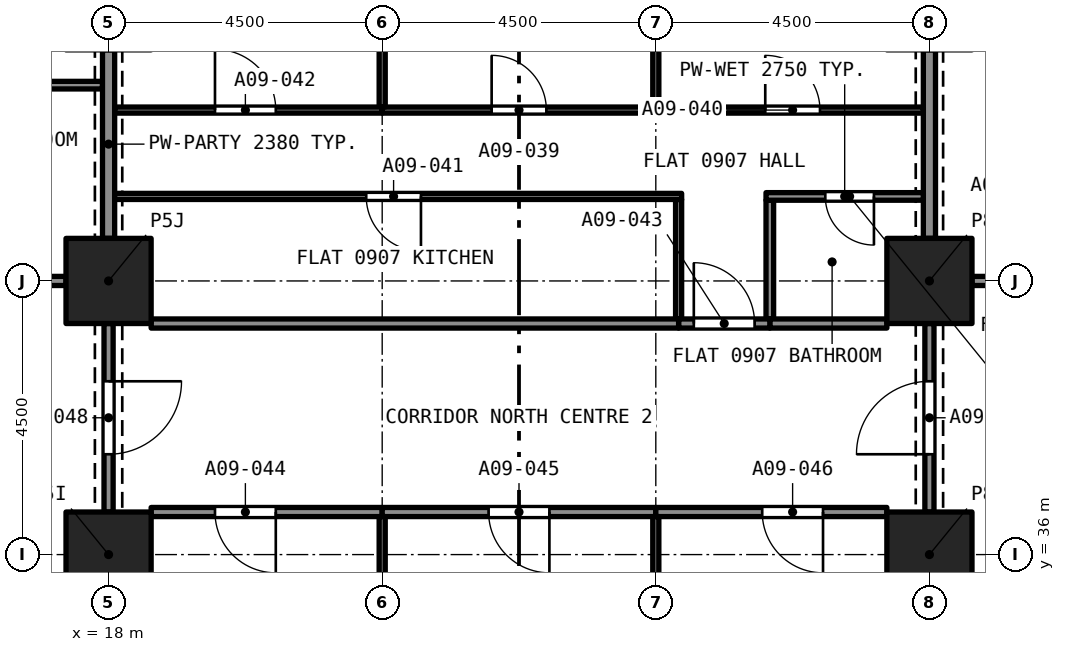
"""IFC4 building model, lengths in metres.
Left out: names, types, materials, properties, quantities, classifications, styles, units other than length and angle.
Written with IfcOpenShell. Run it as: python <this file> out.ifc"""

import sys

from ifc_helpers import new_model, si_unit, direction, frame, frame_2d, origin, origin_2d, place, context, subcontext, project, spatial, rectangle, extrude, element, fill, save


model = new_model("IFC4")
c1 = context("Model", 3, precision=1e-05, world=origin(), true_north=direction((0.0, 1.0)))
c2 = subcontext(c1, "Body", "Model", "MODEL_VIEW")
j1 = project(units=[si_unit("LENGTHUNIT", "METRE"), si_unit("PLANEANGLEUNIT", "RADIAN")], contexts=[c1])
p1 = place(None, origin())
s1 = spatial("IfcSite", under=j1, at=p1, CompositionType="ELEMENT")
p2 = place(p1, origin())
s2 = spatial("IfcBuilding", under=s1, at=p2, CompositionType="ELEMENT")
p3 = place(p2, frame((0.0, 0.0, 40.0)))
s3 = spatial("IfcBuildingStorey", under=s2, at=p3, CompositionType="ELEMENT", Elevation=40.0)
for number, where, z_axis, x_axis in (
    (1, (18.0, 36.0, 0.0), (0.0, 0.0, 1.0), (1.0, 0.0, 0.0)),
    (2, (31.5, 36.0, 0.0), (0.0, 0.0, 1.0), (1.0, 0.0, 0.0)),
    (3, (18.0, 40.5, 0.0), (0.0, 0.0, 1.0), (1.0, 0.0, 0.0)),
    (4, (31.5, 40.5, 0.0), (0.0, 0.0, 1.0), (1.0, 0.0, 0.0)),
):
    element("IfcColumn", number, at=place(p3, frame(where, z_axis=z_axis, x_axis=x_axis)), inside=s3, PredefinedType="COLUMN", context=c2, shape_type="SweptSolid", body=[
        extrude(rectangle(XDim=1.4, YDim=1.4, at=origin_2d()), origin(), (0.0, 0.0, 1.0), 3.2),
    ])
p4 = place(p3, frame((17.9, 43.72, 0.0), z_axis=(0.0, 0.0, 1.0), x_axis=(-1.0, 0.0, 0.0)))
e5 = element("IfcWall", 5, at=p4, inside=s3, PredefinedType="PARTITIONING", context=c2, shape_type="SweptSolid", body=[
    extrude(rectangle(XDim=4.327, YDim=0.125, at=frame_2d((2.163, 0.0))), origin(), (0.0, 0.0, 1.0), 2.9),
])
p5 = place(p4, frame((1.713, 0.0, 0.0)))
e6 = element("IfcOpeningElement", 6, at=p5, cuts=e5, PredefinedType="OPENING", context=c2, shape_type="SweptSolid", body=[
    extrude(rectangle(XDim=0.8, YDim=2.1, at=frame_2d((0.4, 1.05))), frame((0.0, 0.073, 0.0), z_axis=(0.0, -1.0, 0.0), x_axis=(1.0, 0.0, 0.0)), (0.0, 0.0, 1.0), 0.145),
])
p6 = place(p3, frame((18.0, 41.2, 0.0), z_axis=(0.0, 0.0, 1.0), x_axis=(0.0, 1.0, 0.0)))
e7 = element("IfcWall", 7, at=p6, inside=s3, PredefinedType="PARTITIONING", context=c2, shape_type="SweptSolid", body=[
    extrude(rectangle(XDim=3.1, YDim=0.2, at=frame_2d((1.55, 0.0))), origin(), (0.0, 0.0, 1.0), 2.38),
])
p7 = place(p3, frame((13.511, 40.5, 0.0), z_axis=(0.0, 0.0, 1.0), x_axis=(1.0, 0.0, 0.0)))
e8 = element("IfcWall", 8, at=p7, inside=s3, PredefinedType="PARTITIONING", context=c2, shape_type="SweptSolid", body=[
    extrude(rectangle(XDim=3.789, YDim=0.15, at=frame_2d((1.895, 0.0))), origin(), (0.0, 0.0, 1.0), 2.9),
])
p8 = place(p3, frame((31.5, 41.2, 0.0), z_axis=(0.0, 0.0, 1.0), x_axis=(0.0, 1.0, 0.0)))
e9 = element("IfcWall", 9, at=p8, inside=s3, PredefinedType="PARTITIONING", context=c2, shape_type="SweptSolid", body=[
    extrude(rectangle(XDim=3.1, YDim=0.2, at=frame_2d((1.55, 0.0))), origin(), (0.0, 0.0, 1.0), 2.38),
])
p9 = place(p3, frame((32.2, 40.5, 0.0), z_axis=(0.0, 0.0, 1.0), x_axis=(1.0, 0.0, 0.0)))
e10 = element("IfcWall", 10, at=p9, inside=s3, PredefinedType="PARTITIONING", context=c2, shape_type="SweptSolid", body=[
    extrude(rectangle(XDim=2.3, YDim=0.15, at=frame_2d((1.15, 0.0))), origin(), (0.0, 0.0, 1.0), 2.9),
])
p10 = place(p9, frame((1.05, 0.0, 0.0)))
e11 = element("IfcOpeningElement", 11, at=p10, cuts=e10, PredefinedType="OPENING", context=c2, shape_type="SweptSolid", body=[
    extrude(rectangle(XDim=1.0, YDim=2.1, at=frame_2d((0.5, 1.05))), frame((0.0, 0.085, 0.0), z_axis=(0.0, -1.0, 0.0), x_axis=(1.0, 0.0, 0.0)), (0.0, 0.0, 1.0), 0.17),
])
p11 = place(p3, frame((28.875, 39.875, 0.0), z_axis=(0.0, 0.0, 1.0), x_axis=(0.0, 1.0, 0.0)))
e12 = element("IfcWall", 12, at=p11, inside=s3, PredefinedType="PARTITIONING", context=c2, shape_type="SweptSolid", body=[
    extrude(rectangle(XDim=1.952, YDim=0.125, at=frame_2d((0.976, 0.0))), origin(), (0.0, 0.0, 1.0), 2.75),
])
p12 = place(p3, frame((31.4, 41.89, 0.0), z_axis=(0.0, 0.0, 1.0), x_axis=(-1.0, 0.0, 0.0)))
e13 = element("IfcWall", 13, at=p12, inside=s3, PredefinedType="PARTITIONING", context=c2, shape_type="SweptSolid", body=[
    extrude(rectangle(XDim=2.587, YDim=0.125, at=frame_2d((1.294, 0.0))), origin(), (0.0, 0.0, 1.0), 2.75),
])
p13 = place(p12, frame((0.812, 0.0, 0.0)))
e14 = element("IfcOpeningElement", 14, at=p13, cuts=e13, PredefinedType="OPENING", context=c2, shape_type="SweptSolid", body=[
    extrude(rectangle(XDim=0.8, YDim=2.1, at=frame_2d((0.4, 1.05))), frame((0.0, 0.073, 0.0), z_axis=(0.0, -1.0, 0.0), x_axis=(1.0, 0.0, 0.0)), (0.0, 0.0, 1.0), 0.145),
])
p14 = place(p3, frame((28.875, 39.8, 0.0), z_axis=(0.0, 0.0, 1.0), x_axis=(1.0, 0.0, 0.0)))
e15 = element("IfcWall", 15, at=p14, inside=s3, PredefinedType="PARTITIONING", context=c2, shape_type="SweptSolid", body=[
    extrude(rectangle(XDim=1.925, YDim=0.15, at=frame_2d((0.962, 0.0))), origin(), (0.0, 0.0, 1.0), 2.75),
])
p15 = place(p3, frame((27.0, 43.36, 0.0), z_axis=(0.0, 0.0, 1.0), x_axis=(0.0, 1.0, 0.0)))
e16 = element("IfcWall", 16, at=p15, inside=s3, PredefinedType="PARTITIONING", context=c2, shape_type="SweptSolid", body=[
    extrude(rectangle(XDim=5.44, YDim=0.1, at=frame_2d((2.72, 0.0))), origin(), (0.0, 0.0, 1.0), 2.75),
])
p16 = place(p3, frame((22.5, 43.31, 0.0), z_axis=(0.0, 0.0, 1.0), x_axis=(1.0, 0.0, 0.0)))
e17 = element("IfcWall", 17, at=p16, inside=s3, PredefinedType="PARTITIONING", context=c2, shape_type="SweptSolid", body=[
    extrude(rectangle(XDim=4.5, YDim=0.1, at=frame_2d((2.25, 0.0))), origin(), (0.0, 0.0, 1.0), 2.75),
])
p17 = place(p16, frame((1.8, 0.0, 0.0)))
e18 = element("IfcOpeningElement", 18, at=p17, cuts=e17, PredefinedType="OPENING", context=c2, shape_type="SweptSolid", body=[
    extrude(rectangle(XDim=0.9, YDim=2.1, at=frame_2d((0.45, 1.05))), frame((0.0, 0.06, 0.0), z_axis=(0.0, -1.0, 0.0), x_axis=(1.0, 0.0, 0.0)), (0.0, 0.0, 1.0), 0.12),
])
p18 = place(p3, frame((22.5, 43.36, 0.0), z_axis=(0.0, 0.0, 1.0), x_axis=(0.0, 1.0, 0.0)))
e19 = element("IfcWall", 19, at=p18, inside=s3, PredefinedType="PARTITIONING", context=c2, shape_type="SweptSolid", body=[
    extrude(rectangle(XDim=5.44, YDim=0.1, at=frame_2d((2.72, 0.0))), origin(), (0.0, 0.0, 1.0), 2.75),
])
p19 = place(p3, frame((27.0, 43.31, 0.0), z_axis=(0.0, 0.0, 1.0), x_axis=(1.0, 0.0, 0.0)))
e20 = element("IfcWall", 20, at=p19, inside=s3, PredefinedType="PARTITIONING", context=c2, shape_type="SweptSolid", body=[
    extrude(rectangle(XDim=4.4, YDim=0.1, at=frame_2d((2.2, 0.0))), origin(), (0.0, 0.0, 1.0), 2.75),
])
p20 = place(p19, frame((1.8, 0.0, 0.0)))
e21 = element("IfcOpeningElement", 21, at=p20, cuts=e20, PredefinedType="OPENING", context=c2, shape_type="SweptSolid", body=[
    extrude(rectangle(XDim=0.9, YDim=2.1, at=frame_2d((0.45, 1.05))), frame((0.0, 0.06, 0.0), z_axis=(0.0, -1.0, 0.0), x_axis=(1.0, 0.0, 0.0)), (0.0, 0.0, 1.0), 0.12),
])
p21 = place(p3, frame((27.375, 39.875, 0.0), z_axis=(0.0, 0.0, 1.0), x_axis=(0.0, 1.0, 0.0)))
e22 = element("IfcWall", 22, at=p21, inside=s3, PredefinedType="PARTITIONING", context=c2, shape_type="SweptSolid", body=[
    extrude(rectangle(XDim=1.965, YDim=0.1, at=frame_2d((0.982, 0.0))), origin(), (0.0, 0.0, 1.0), 2.75),
])
p22 = place(p3, frame((27.425, 41.89, 0.0), z_axis=(0.0, 0.0, 1.0), x_axis=(-1.0, 0.0, 0.0)))
e23 = element("IfcWall", 23, at=p22, inside=s3, PredefinedType="PARTITIONING", context=c2, shape_type="SweptSolid", body=[
    extrude(rectangle(XDim=9.325, YDim=0.1, at=frame_2d((4.663, 0.0))), origin(), (0.0, 0.0, 1.0), 2.75),
])
p23 = place(p22, frame((4.288, 0.0, 0.0)))
e24 = element("IfcOpeningElement", 24, at=p23, cuts=e23, PredefinedType="OPENING", context=c2, shape_type="SweptSolid", body=[
    extrude(rectangle(XDim=0.9, YDim=2.1, at=frame_2d((0.45, 1.05))), frame((0.0, 0.06, 0.0), z_axis=(0.0, -1.0, 0.0), x_axis=(1.0, 0.0, 0.0)), (0.0, 0.0, 1.0), 0.12),
])
p24 = place(p3, frame((18.1, 43.31, 0.0), z_axis=(0.0, 0.0, 1.0), x_axis=(1.0, 0.0, 0.0)))
e25 = element("IfcWall", 25, at=p24, inside=s3, PredefinedType="PARTITIONING", context=c2, shape_type="SweptSolid", body=[
    extrude(rectangle(XDim=4.4, YDim=0.1, at=frame_2d((2.2, 0.0))), origin(), (0.0, 0.0, 1.0), 2.75),
])
p25 = place(p24, frame((1.65, 0.0, 0.0)))
e26 = element("IfcOpeningElement", 26, at=p25, cuts=e25, PredefinedType="OPENING", context=c2, shape_type="SweptSolid", body=[
    extrude(rectangle(XDim=1.0, YDim=2.1, at=frame_2d((0.5, 1.05))), frame((0.0, 0.06, 0.0), z_axis=(0.0, -1.0, 0.0), x_axis=(1.0, 0.0, 0.0)), (0.0, 0.0, 1.0), 0.12),
])
p26 = place(p3, frame((27.375, 39.8, 0.0), z_axis=(0.0, 0.0, 1.0), x_axis=(1.0, 0.0, 0.0)))
e27 = element("IfcWall", 27, at=p26, inside=s3, PredefinedType="PARTITIONING", context=c2, shape_type="SweptSolid", body=[
    extrude(rectangle(XDim=1.5, YDim=0.15, at=frame_2d((0.75, 0.0))), origin(), (0.0, 0.0, 1.0), 2.75),
])
p27 = place(p26, frame((0.25, 0.0, 0.0)))
e28 = element("IfcOpeningElement", 28, at=p27, cuts=e27, PredefinedType="OPENING", context=c2, shape_type="SweptSolid", body=[
    extrude(rectangle(XDim=1.0, YDim=2.1, at=frame_2d((0.5, 1.05))), frame((0.0, 0.085, 0.0), z_axis=(0.0, -1.0, 0.0), x_axis=(1.0, 0.0, 0.0)), (0.0, 0.0, 1.0), 0.17),
])
p28 = place(p3, frame((18.7, 39.8, 0.0), z_axis=(0.0, 0.0, 1.0), x_axis=(1.0, 0.0, 0.0)))
e29 = element("IfcWall", 29, at=p28, inside=s3, PredefinedType="PARTITIONING", context=c2, shape_type="SweptSolid", body=[
    extrude(rectangle(XDim=8.675, YDim=0.15, at=frame_2d((4.337, 0.0))), origin(), (0.0, 0.0, 1.0), 2.75),
])
p29 = place(p3, frame((22.5, 36.7, 0.0), z_axis=(0.0, 0.0, 1.0), x_axis=(-1.0, 0.0, 0.0)))
e30 = element("IfcWall", 30, at=p29, inside=s3, PredefinedType="PARTITIONING", context=c2, shape_type="SweptSolid", body=[
    extrude(rectangle(XDim=3.8, YDim=0.15, at=frame_2d((1.9, 0.0))), origin(), (0.0, 0.0, 1.0), 2.75),
])
p30 = place(p29, frame((1.75, 0.0, 0.0)))
e31 = element("IfcOpeningElement", 31, at=p30, cuts=e30, PredefinedType="OPENING", context=c2, shape_type="SweptSolid", body=[
    extrude(rectangle(XDim=1.0, YDim=2.1, at=frame_2d((0.5, 1.05))), frame((0.0, 0.085, 0.0), z_axis=(0.0, -1.0, 0.0), x_axis=(1.0, 0.0, 0.0)), (0.0, 0.0, 1.0), 0.17),
])
p31 = place(p3, frame((27.0, 36.7, 0.0), z_axis=(0.0, 0.0, 1.0), x_axis=(-1.0, 0.0, 0.0)))
e32 = element("IfcWall", 32, at=p31, inside=s3, PredefinedType="PARTITIONING", context=c2, shape_type="SweptSolid", body=[
    extrude(rectangle(XDim=4.5, YDim=0.15, at=frame_2d((2.25, 0.0))), origin(), (0.0, 0.0, 1.0), 2.75),
])
p32 = place(p31, frame((1.75, 0.0, 0.0)))
e33 = element("IfcOpeningElement", 33, at=p32, cuts=e32, PredefinedType="OPENING", context=c2, shape_type="SweptSolid", body=[
    extrude(rectangle(XDim=1.0, YDim=2.1, at=frame_2d((0.5, 1.05))), frame((0.0, 0.085, 0.0), z_axis=(0.0, -1.0, 0.0), x_axis=(1.0, 0.0, 0.0)), (0.0, 0.0, 1.0), 0.17),
])
p33 = place(p3, frame((30.8, 36.7, 0.0), z_axis=(0.0, 0.0, 1.0), x_axis=(-1.0, 0.0, 0.0)))
e34 = element("IfcWall", 34, at=p33, inside=s3, PredefinedType="PARTITIONING", context=c2, shape_type="SweptSolid", body=[
    extrude(rectangle(XDim=3.8, YDim=0.15, at=frame_2d((1.9, 0.0))), origin(), (0.0, 0.0, 1.0), 2.75),
])
p34 = place(p33, frame((1.05, 0.0, 0.0)))
e35 = element("IfcOpeningElement", 35, at=p34, cuts=e34, PredefinedType="OPENING", context=c2, shape_type="SweptSolid", body=[
    extrude(rectangle(XDim=1.0, YDim=2.1, at=frame_2d((0.5, 1.05))), frame((0.0, 0.085, 0.0), z_axis=(0.0, -1.0, 0.0), x_axis=(1.0, 0.0, 0.0)), (0.0, 0.0, 1.0), 0.17),
])
p35 = place(p3, frame((31.5, 36.7, 0.0), z_axis=(0.0, 0.0, 1.0), x_axis=(0.0, 1.0, 0.0)))
e36 = element("IfcWall", 36, at=p35, inside=s3, PredefinedType="PARTITIONING", context=c2, shape_type="SweptSolid", body=[
    extrude(rectangle(XDim=3.1, YDim=0.15, at=frame_2d((1.55, 0.0))), origin(), (0.0, 0.0, 1.0), 2.38),
])
p36 = place(p35, frame((0.95, 0.0, 0.0)))
e37 = element("IfcOpeningElement", 37, at=p36, cuts=e36, PredefinedType="OPENING", context=c2, shape_type="SweptSolid", body=[
    extrude(rectangle(XDim=1.2, YDim=2.1, at=frame_2d((0.6, 1.05))), frame((0.0, 0.085, 0.0), z_axis=(0.0, -1.0, 0.0), x_axis=(1.0, 0.0, 0.0)), (0.0, 0.0, 1.0), 0.17),
])
p37 = place(p3, frame((18.0, 39.8, 0.0), z_axis=(0.0, 0.0, 1.0), x_axis=(0.0, -1.0, 0.0)))
e38 = element("IfcWall", 38, at=p37, inside=s3, PredefinedType="PARTITIONING", context=c2, shape_type="SweptSolid", body=[
    extrude(rectangle(XDim=3.1, YDim=0.15, at=frame_2d((1.55, 0.0))), origin(), (0.0, 0.0, 1.0), 2.38),
])
p38 = place(p37, frame((0.95, 0.0, 0.0)))
e39 = element("IfcOpeningElement", 39, at=p38, cuts=e38, PredefinedType="OPENING", context=c2, shape_type="SweptSolid", body=[
    extrude(rectangle(XDim=1.2, YDim=2.1, at=frame_2d((0.6, 1.05))), frame((0.0, 0.085, 0.0), z_axis=(0.0, -1.0, 0.0), x_axis=(1.0, 0.0, 0.0)), (0.0, 0.0, 1.0), 0.17),
])
for number, where, z_axis, x_axis in (
    (40, (22.5, 26.375, 0.0), (0.0, 0.0, 1.0), (0.0, 1.0, 0.0)),
    (41, (27.0, 26.375, 0.0), (0.0, 0.0, 1.0), (0.0, 1.0, 0.0)),
):
    element("IfcWall", number, at=place(p3, frame(where, z_axis=z_axis, x_axis=x_axis)), inside=s3, PredefinedType="PARTITIONING", context=c2, shape_type="SweptSolid", body=[
        extrude(rectangle(XDim=10.25, YDim=0.1, at=frame_2d((5.125, 0.0))), origin(), (0.0, 0.0, 1.0), 2.75),
    ])
p39 = place(p13, origin())
e42 = element("IfcDoor", 42, at=p39, inside=s3, OperationType="SINGLE_SWING_LEFT", PredefinedType="DOOR", context=c2, shape_type="SweptSolid", body=[
    extrude(rectangle(XDim=0.8, YDim=2.1, at=frame_2d((0.4, 1.05))), frame((0.0, 0.025, 0.0), z_axis=(0.0, -1.0, 0.0), x_axis=(1.0, 0.0, 0.0)), (0.0, 0.0, 1.0), 0.05),
])
fill(e14, e42)
p40 = place(p17, origin())
e43 = element("IfcDoor", 43, at=p40, inside=s3, OperationType="SINGLE_SWING_LEFT", PredefinedType="DOOR", context=c2, shape_type="SweptSolid", body=[
    extrude(rectangle(XDim=0.9, YDim=2.1, at=frame_2d((0.45, 1.05))), frame((0.0, 0.025, 0.0), z_axis=(0.0, -1.0, 0.0), x_axis=(1.0, 0.0, 0.0)), (0.0, 0.0, 1.0), 0.05),
])
fill(e18, e43)
p41 = place(p20, origin())
e44 = element("IfcDoor", 44, at=p41, inside=s3, OperationType="SINGLE_SWING_RIGHT", PredefinedType="DOOR", context=c2, shape_type="SweptSolid", body=[
    extrude(rectangle(XDim=0.9, YDim=2.1, at=frame_2d((0.45, 1.05))), frame((0.0, 0.025, 0.0), z_axis=(0.0, -1.0, 0.0), x_axis=(1.0, 0.0, 0.0)), (0.0, 0.0, 1.0), 0.05),
])
fill(e21, e44)
p42 = place(p23, origin())
e45 = element("IfcDoor", 45, at=p42, inside=s3, OperationType="SINGLE_SWING_RIGHT", PredefinedType="DOOR", context=c2, shape_type="SweptSolid", body=[
    extrude(rectangle(XDim=0.9, YDim=2.1, at=frame_2d((0.45, 1.05))), frame((0.0, 0.025, 0.0), z_axis=(0.0, -1.0, 0.0), x_axis=(1.0, 0.0, 0.0)), (0.0, 0.0, 1.0), 0.05),
])
fill(e24, e45)
p43 = place(p25, origin())
e46 = element("IfcDoor", 46, at=p43, inside=s3, OperationType="SINGLE_SWING_LEFT", PredefinedType="DOOR", context=c2, shape_type="SweptSolid", body=[
    extrude(rectangle(XDim=1.0, YDim=2.1, at=frame_2d((0.5, 1.05))), frame((0.0, 0.025, 0.0), z_axis=(0.0, -1.0, 0.0), x_axis=(1.0, 0.0, 0.0)), (0.0, 0.0, 1.0), 0.05),
])
fill(e26, e46)
p44 = place(p27, origin())
e47 = element("IfcDoor", 47, at=p44, inside=s3, OperationType="SINGLE_SWING_RIGHT", PredefinedType="DOOR", context=c2, shape_type="SweptSolid", body=[
    extrude(rectangle(XDim=1.0, YDim=2.1, at=frame_2d((0.5, 1.05))), frame((0.0, 0.025, 0.0), z_axis=(0.0, -1.0, 0.0), x_axis=(1.0, 0.0, 0.0)), (0.0, 0.0, 1.0), 0.05),
])
fill(e28, e47)
p45 = place(p30, origin())
e48 = element("IfcDoor", 48, at=p45, inside=s3, OperationType="SINGLE_SWING_RIGHT", PredefinedType="DOOR", context=c2, shape_type="SweptSolid", body=[
    extrude(rectangle(XDim=1.0, YDim=2.1, at=frame_2d((0.5, 1.05))), frame((0.0, 0.025, 0.0), z_axis=(0.0, -1.0, 0.0), x_axis=(1.0, 0.0, 0.0)), (0.0, 0.0, 1.0), 0.05),
])
fill(e31, e48)
p46 = place(p32, origin())
e49 = element("IfcDoor", 49, at=p46, inside=s3, OperationType="SINGLE_SWING_RIGHT", PredefinedType="DOOR", context=c2, shape_type="SweptSolid", body=[
    extrude(rectangle(XDim=1.0, YDim=2.1, at=frame_2d((0.5, 1.05))), frame((0.0, 0.025, 0.0), z_axis=(0.0, -1.0, 0.0), x_axis=(1.0, 0.0, 0.0)), (0.0, 0.0, 1.0), 0.05),
])
fill(e33, e49)
p47 = place(p34, origin())
e50 = element("IfcDoor", 50, at=p47, inside=s3, OperationType="SINGLE_SWING_LEFT", PredefinedType="DOOR", context=c2, shape_type="SweptSolid", body=[
    extrude(rectangle(XDim=1.0, YDim=2.1, at=frame_2d((0.5, 1.05))), frame((0.0, 0.025, 0.0), z_axis=(0.0, -1.0, 0.0), x_axis=(1.0, 0.0, 0.0)), (0.0, 0.0, 1.0), 0.05),
])
fill(e35, e50)
p48 = place(p36, origin())
e51 = element("IfcDoor", 51, at=p48, inside=s3, OperationType="SINGLE_SWING_LEFT", PredefinedType="DOOR", context=c2, shape_type="SweptSolid", body=[
    extrude(rectangle(XDim=1.2, YDim=2.1, at=frame_2d((0.6, 1.05))), frame((0.0, 0.025, 0.0), z_axis=(0.0, -1.0, 0.0), x_axis=(1.0, 0.0, 0.0)), (0.0, 0.0, 1.0), 0.05),
])
fill(e37, e51)
p49 = place(p38, origin())
e52 = element("IfcDoor", 52, at=p49, inside=s3, OperationType="SINGLE_SWING_LEFT", PredefinedType="DOOR", context=c2, shape_type="SweptSolid", body=[
    extrude(rectangle(XDim=1.2, YDim=2.1, at=frame_2d((0.6, 1.05))), frame((0.0, 0.025, 0.0), z_axis=(0.0, -1.0, 0.0), x_axis=(1.0, 0.0, 0.0)), (0.0, 0.0, 1.0), 0.05),
])
fill(e39, e52)
save(model, sys.argv[1])
